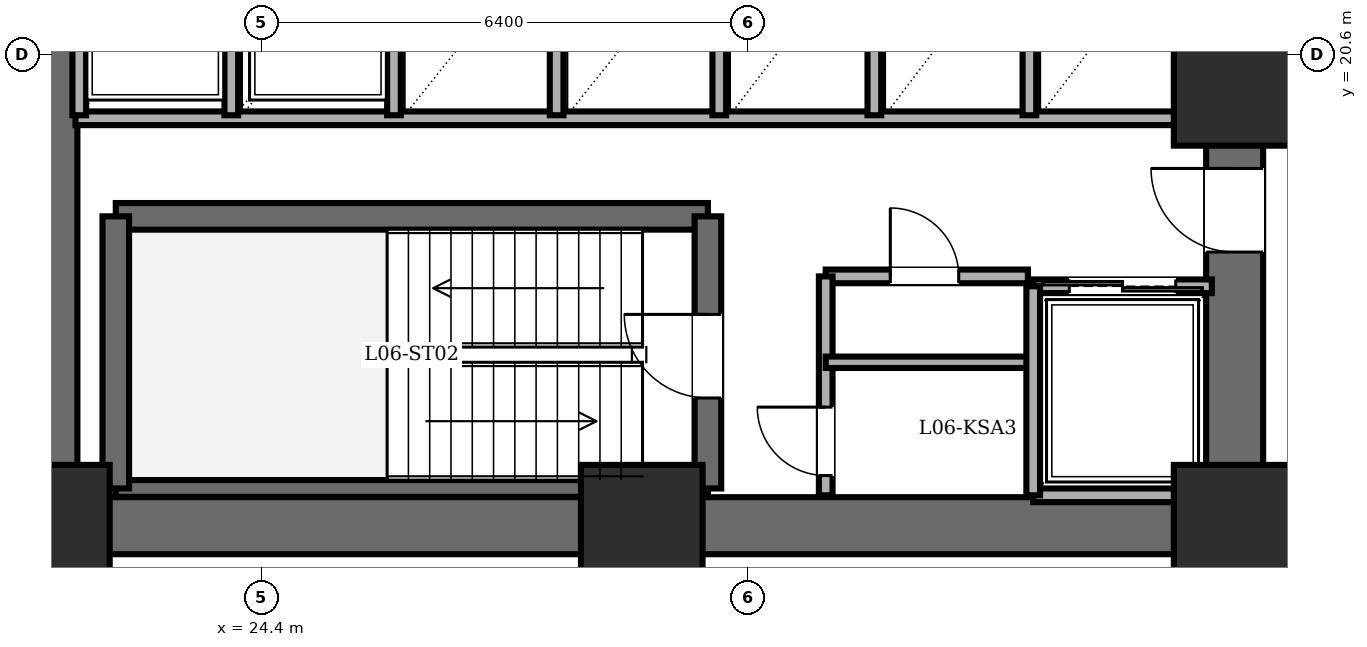
"""IFC4 building model, lengths in metres.
Left out: names, types, materials, properties, quantities, classifications, styles, units other than length and angle.
Written with IfcOpenShell. Run it as: python <this file> out.ifc"""

import sys

from ifc_helpers import new_model, si_unit, direction, frame, frame_2d, origin, origin_2d, place, context, subcontext, project, spatial, rectangle, extrude, element, fill, save


model = new_model("IFC4")
c1 = context("Model", 3, precision=1e-05, world=origin(), true_north=direction((0.0, 1.0)))
c2 = subcontext(c1, "Body", "Model", "MODEL_VIEW")
j1 = project(units=[si_unit("LENGTHUNIT", "METRE"), si_unit("PLANEANGLEUNIT", "RADIAN")], contexts=[c1])
p1 = place(None, origin())
s1 = spatial("IfcSite", under=j1, at=p1, CompositionType="ELEMENT")
p2 = place(p1, origin())
s2 = spatial("IfcBuilding", under=s1, at=p2, CompositionType="ELEMENT")
p3 = place(p2, frame((0.0, 0.0, 24.0)))
s3 = spatial("IfcBuildingStorey", under=s2, at=p3, CompositionType="ELEMENT", Elevation=24.0)
for number, where, z_axis, x_axis in (
    (1, (21.6, 14.4, 0.0), (0.0, 0.0, 1.0), (1.0, 0.0, 0.0)),
    (2, (29.4, 14.4, 0.0), (0.0, 0.0, 1.0), (1.0, 0.0, 0.0)),
    (3, (37.2, 14.4, 0.0), (0.0, 0.0, 1.0), (1.0, 0.0, 0.0)),
    (4, (37.2, 20.2, 0.0), (0.0, 0.0, 1.0), (1.0, 0.0, 0.0)),
):
    element("IfcColumn", number, at=place(p3, frame(where, z_axis=z_axis, x_axis=x_axis)), inside=s3, PredefinedType="COLUMN", context=c2, shape_type="SweptSolid", body=[
        extrude(rectangle(XDim=1.6, YDim=1.6, at=origin_2d()), origin(), (0.0, 0.0, 1.0), 4.8),
    ])
p4 = place(p3, frame((21.6, 14.4, 0.0), z_axis=(0.0, 0.0, 1.0), x_axis=(0.0, 1.0, 0.0)))
e5 = element("IfcWall", 5, at=p4, inside=s3, PredefinedType="SHEAR", context=c2, shape_type="SweptSolid", body=[
    extrude(rectangle(XDim=19.2, YDim=0.75, at=frame_2d((9.6, 0.0))), origin(), (0.0, 0.0, 1.0), 4.6),
])
p5 = place(p3, frame((37.2, 14.4, 0.0), z_axis=(0.0, 0.0, 1.0), x_axis=(-1.0, 0.0, 0.0)))
e6 = element("IfcWall", 6, at=p5, inside=s3, PredefinedType="SHEAR", context=c2, shape_type="SweptSolid", body=[
    extrude(rectangle(XDim=15.6, YDim=0.75, at=frame_2d((7.8, 0.0))), origin(), (0.0, 0.0, 1.0), 4.6),
])
p6 = place(p3, frame((37.2, 14.4, 0.0), z_axis=(0.0, 0.0, 1.0), x_axis=(0.0, 1.0, 0.0)))
e7 = element("IfcWall", 7, at=p6, inside=s3, PredefinedType="SHEAR", context=c2, shape_type="SweptSolid", body=[
    extrude(rectangle(XDim=19.2, YDim=0.75, at=frame_2d((9.6, 0.0))), origin(), (0.0, 0.0, 1.0), 4.6),
])
p7 = place(p6, frame((15.8, 0.0, 0.0)))
e8 = element("IfcOpeningElement", 8, at=p7, cuts=e7, PredefinedType="OPENING", context=c2, shape_type="SweptSolid", body=[
    extrude(rectangle(XDim=1.15, YDim=2.15, at=frame_2d((0.575, 1.075))), frame((0.0, 0.385, 0.0), z_axis=(0.0, -1.0, 0.0), x_axis=(1.0, 0.0, 0.0)), (0.0, 0.0, 1.0), 0.77),
])
p8 = place(p6, frame((3.6, 0.0, 0.0)))
e9 = element("IfcOpeningElement", 9, at=p8, cuts=e7, PredefinedType="OPENING", context=c2, shape_type="SweptSolid", body=[
    extrude(rectangle(XDim=1.1, YDim=2.15, at=frame_2d((0.55, 1.075))), frame((0.0, 0.385, 0.0), z_axis=(0.0, -1.0, 0.0), x_axis=(1.0, 0.0, 0.0)), (0.0, 0.0, 1.0), 0.77),
])
p9 = place(p6, frame((8.6, 0.0, 0.0)))
e10 = element("IfcOpeningElement", 10, at=p9, cuts=e7, PredefinedType="OPENING", context=c2, shape_type="SweptSolid", body=[
    extrude(rectangle(XDim=1.3, YDim=2.2, at=frame_2d((0.65, 1.1))), frame((0.0, 0.385, 0.0), z_axis=(0.0, -1.0, 0.0), x_axis=(1.0, 0.0, 0.0)), (0.0, 0.0, 1.0), 0.77),
])
p10 = place(p3, frame((22.48, 18.47, 0.0), z_axis=(0.0, 0.0, 1.0), x_axis=(1.0, 0.0, 0.0)))
e11 = element("IfcWall", 11, at=p10, inside=s3, PredefinedType="SOLIDWALL", context=c2, shape_type="SweptSolid", body=[
    extrude(rectangle(XDim=7.79, YDim=0.35, at=frame_2d((3.895, 0.0))), origin(), (0.0, 0.0, 1.0), 4.6),
])
p11 = place(p3, frame((22.48, 14.89, 0.0), z_axis=(0.0, 0.0, 1.0), x_axis=(1.0, 0.0, 0.0)))
e12 = element("IfcWall", 12, at=p11, inside=s3, PredefinedType="PARTITIONING", context=c2, shape_type="SweptSolid", body=[
    extrude(rectangle(XDim=7.79, YDim=0.22, at=frame_2d((3.895, 0.0))), origin(), (0.0, 0.0, 1.0), 4.6),
])
p12 = place(p3, frame((22.48, 14.89, 0.0), z_axis=(0.0, 0.0, 1.0), x_axis=(0.0, 1.0, 0.0)))
e13 = element("IfcWall", 13, at=p12, inside=s3, PredefinedType="SOLIDWALL", context=c2, shape_type="SweptSolid", body=[
    extrude(rectangle(XDim=3.58, YDim=0.35, at=frame_2d((1.79, 0.0))), origin(), (0.0, 0.0, 1.0), 4.6),
])
p13 = place(p3, frame((30.27, 14.89, 0.0), z_axis=(0.0, 0.0, 1.0), x_axis=(0.0, 1.0, 0.0)))
e14 = element("IfcWall", 14, at=p13, inside=s3, PredefinedType="SOLIDWALL", context=c2, shape_type="SweptSolid", body=[
    extrude(rectangle(XDim=3.58, YDim=0.35, at=frame_2d((1.79, 0.0))), origin(), (0.0, 0.0, 1.0), 4.6),
])
p14 = place(p13, frame((1.19, 0.0, 0.0)))
e15 = element("IfcOpeningElement", 15, at=p14, cuts=e14, PredefinedType="OPENING", context=c2, shape_type="SweptSolid", body=[
    extrude(rectangle(XDim=1.1, YDim=2.15, at=frame_2d((0.55, 1.075))), frame((0.0, 0.185, 0.0), z_axis=(0.0, -1.0, 0.0), x_axis=(1.0, 0.0, 0.0)), (0.0, 0.0, 1.0), 0.37),
])
p15 = place(p3, frame((21.95, 19.76, 0.0), z_axis=(0.0, 0.0, 1.0), x_axis=(1.0, 0.0, 0.0)))
e16 = element("IfcWall", 16, at=p15, inside=s3, PredefinedType="PARTITIONING", context=c2, shape_type="SweptSolid", body=[
    extrude(rectangle(XDim=14.87, YDim=0.18, at=frame_2d((7.435, 0.0))), origin(), (0.0, 0.0, 1.0), 4.6),
])
p16 = place(p3, frame((31.82, 17.68, 0.0), z_axis=(0.0, 0.0, 1.0), x_axis=(1.0, 0.0, 0.0)))
e17 = element("IfcWall", 17, at=p16, inside=s3, PredefinedType="PARTITIONING", context=c2, shape_type="SweptSolid", body=[
    extrude(rectangle(XDim=2.66, YDim=0.18, at=frame_2d((1.33, 0.0))), origin(), (0.0, 0.0, 1.0), 4.6),
])
p17 = place(p16, frame((0.85, 0.0, 0.0)))
e18 = element("IfcOpeningElement", 18, at=p17, cuts=e17, PredefinedType="OPENING", context=c2, shape_type="SweptSolid", body=[
    extrude(rectangle(XDim=0.9, YDim=2.05, at=frame_2d((0.45, 1.025))), frame((0.0, 0.1, 0.0), z_axis=(0.0, -1.0, 0.0), x_axis=(1.0, 0.0, 0.0)), (0.0, 0.0, 1.0), 0.2),
])
p18 = place(p3, frame((31.82, 14.8, 0.0), z_axis=(0.0, 0.0, 1.0), x_axis=(0.0, 1.0, 0.0)))
e19 = element("IfcWall", 19, at=p18, inside=s3, PredefinedType="PARTITIONING", context=c2, shape_type="SweptSolid", body=[
    extrude(rectangle(XDim=2.88, YDim=0.18, at=frame_2d((1.44, 0.0))), origin(), (0.0, 0.0, 1.0), 4.6),
])
p19 = place(p18, frame((0.26, 0.0, 0.0)))
e20 = element("IfcOpeningElement", 20, at=p19, cuts=e19, PredefinedType="OPENING", context=c2, shape_type="SweptSolid", body=[
    extrude(rectangle(XDim=0.9, YDim=2.05, at=frame_2d((0.45, 1.025))), frame((0.0, 0.1, 0.0), z_axis=(0.0, -1.0, 0.0), x_axis=(1.0, 0.0, 0.0)), (0.0, 0.0, 1.0), 0.2),
])
p20 = place(p3, frame((31.82, 16.55, 0.0), z_axis=(0.0, 0.0, 1.0), x_axis=(1.0, 0.0, 0.0)))
e21 = element("IfcWall", 21, at=p20, inside=s3, PredefinedType="PARTITIONING", context=c2, shape_type="SweptSolid", body=[
    extrude(rectangle(XDim=2.66, YDim=0.15, at=frame_2d((1.33, 0.0))), origin(), (0.0, 0.0, 1.0), 4.6),
])
p21 = place(p3, frame((34.55, 17.55, 0.0), z_axis=(0.0, 0.0, 1.0), x_axis=(1.0, 0.0, 0.0)))
e22 = element("IfcWall", 22, at=p21, inside=s3, PredefinedType="PARTITIONING", context=c2, shape_type="SweptSolid", body=[
    extrude(rectangle(XDim=2.35, YDim=0.18, at=frame_2d((1.175, 0.0))), origin(), (0.0, 0.0, 1.0), 4.6),
])
p22 = place(p21, frame((0.475, 0.0, 0.0)))
e23 = element("IfcOpeningElement", 23, at=p22, cuts=e22, PredefinedType="OPENING", context=c2, shape_type="SweptSolid", body=[
    extrude(rectangle(XDim=1.4, YDim=2.3, at=frame_2d((0.7, 1.15))), frame((0.0, 0.1, 0.0), z_axis=(0.0, -1.0, 0.0), x_axis=(1.0, 0.0, 0.0)), (0.0, 0.0, 1.0), 0.2),
])
p23 = place(p3, frame((36.9, 14.8, 0.0), z_axis=(0.0, 0.0, 1.0), x_axis=(-1.0, 0.0, 0.0)))
e24 = element("IfcWall", 24, at=p23, inside=s3, PredefinedType="PARTITIONING", context=c2, shape_type="SweptSolid", body=[
    extrude(rectangle(XDim=2.35, YDim=0.18, at=frame_2d((1.175, 0.0))), origin(), (0.0, 0.0, 1.0), 4.6),
])
p24 = place(p3, frame((34.55, 17.55, 0.0), z_axis=(0.0, 0.0, 1.0), x_axis=(0.0, -1.0, 0.0)))
e25 = element("IfcWall", 25, at=p24, inside=s3, PredefinedType="PARTITIONING", context=c2, shape_type="SweptSolid", body=[
    extrude(rectangle(XDim=2.75, YDim=0.18, at=frame_2d((1.375, 0.0))), origin(), (0.0, 0.0, 1.0), 4.6),
])
for number, where, z_axis, x_axis in (
    (26, (24.0, 19.8, 0.0), (0.0, 0.0, 1.0), (0.0, 1.0, 0.0)),
    (27, (22.0, 22.3, 0.0), (0.0, 0.0, 1.0), (0.0, -1.0, 0.0)),
    (28, (26.14, 19.8, 0.0), (0.0, 0.0, 1.0), (0.0, 1.0, 0.0)),
    (29, (28.28, 19.8, 0.0), (0.0, 0.0, 1.0), (0.0, 1.0, 0.0)),
    (30, (30.42, 19.8, 0.0), (0.0, 0.0, 1.0), (0.0, 1.0, 0.0)),
    (31, (32.46, 19.8, 0.0), (0.0, 0.0, 1.0), (0.0, 1.0, 0.0)),
    (32, (34.5, 19.8, 0.0), (0.0, 0.0, 1.0), (0.0, 1.0, 0.0)),
    (33, (36.54, 19.8, 0.0), (0.0, 0.0, 1.0), (0.0, 1.0, 0.0)),
):
    element("IfcWall", number, at=place(p3, frame(where, z_axis=z_axis, x_axis=x_axis)), inside=s3, PredefinedType="PARTITIONING", context=c2, shape_type="SweptSolid", body=[
        extrude(rectangle(XDim=2.5, YDim=0.18, at=frame_2d((1.25, 0.0))), origin(), (0.0, 0.0, 1.0), 4.6),
    ])
p25 = place(p14, origin())
e34 = element("IfcDoor", 34, at=p25, inside=s3, OperationType="SINGLE_SWING_RIGHT", PredefinedType="DOOR", context=c2, shape_type="SweptSolid", body=[
    extrude(rectangle(XDim=1.1, YDim=2.15, at=frame_2d((0.55, 1.075))), frame((0.0, 0.025, 0.0), z_axis=(0.0, -1.0, 0.0), x_axis=(1.0, 0.0, 0.0)), (0.0, 0.0, 1.0), 0.05),
])
fill(e15, e34)
p26 = place(p8, origin())
e35 = element("IfcDoor", 35, at=p26, inside=s3, OperationType="SINGLE_SWING_RIGHT", PredefinedType="DOOR", context=c2, shape_type="SweptSolid", body=[
    extrude(rectangle(XDim=1.1, YDim=2.15, at=frame_2d((0.55, 1.075))), frame((0.0, 0.025, 0.0), z_axis=(0.0, -1.0, 0.0), x_axis=(1.0, 0.0, 0.0)), (0.0, 0.0, 1.0), 0.05),
])
fill(e9, e35)
p27 = place(p17, origin())
e36 = element("IfcDoor", 36, at=p27, inside=s3, OperationType="SINGLE_SWING_LEFT", PredefinedType="DOOR", context=c2, shape_type="SweptSolid", body=[
    extrude(rectangle(XDim=0.9, YDim=2.05, at=frame_2d((0.45, 1.025))), frame((0.0, 0.025, 0.0), z_axis=(0.0, -1.0, 0.0), x_axis=(1.0, 0.0, 0.0)), (0.0, 0.0, 1.0), 0.05),
])
fill(e18, e36)
p28 = place(p19, origin())
e37 = element("IfcDoor", 37, at=p28, inside=s3, OperationType="SINGLE_SWING_RIGHT", PredefinedType="DOOR", context=c2, shape_type="SweptSolid", body=[
    extrude(rectangle(XDim=0.9, YDim=2.05, at=frame_2d((0.45, 1.025))), frame((0.0, 0.025, 0.0), z_axis=(0.0, -1.0, 0.0), x_axis=(1.0, 0.0, 0.0)), (0.0, 0.0, 1.0), 0.05),
])
fill(e20, e37)
p29 = place(p22, origin())
e38 = element("IfcDoor", 38, at=p29, inside=s3, OperationType="DOUBLE_DOOR_SLIDING", PredefinedType="DOOR", context=c2, shape_type="SweptSolid", body=[
    extrude(rectangle(XDim=1.4, YDim=2.3, at=frame_2d((0.7, 1.15))), frame((0.0, 0.025, 0.0), z_axis=(0.0, -1.0, 0.0), x_axis=(1.0, 0.0, 0.0)), (0.0, 0.0, 1.0), 0.05),
])
fill(e23, e38)
save(model, sys.argv[1])
